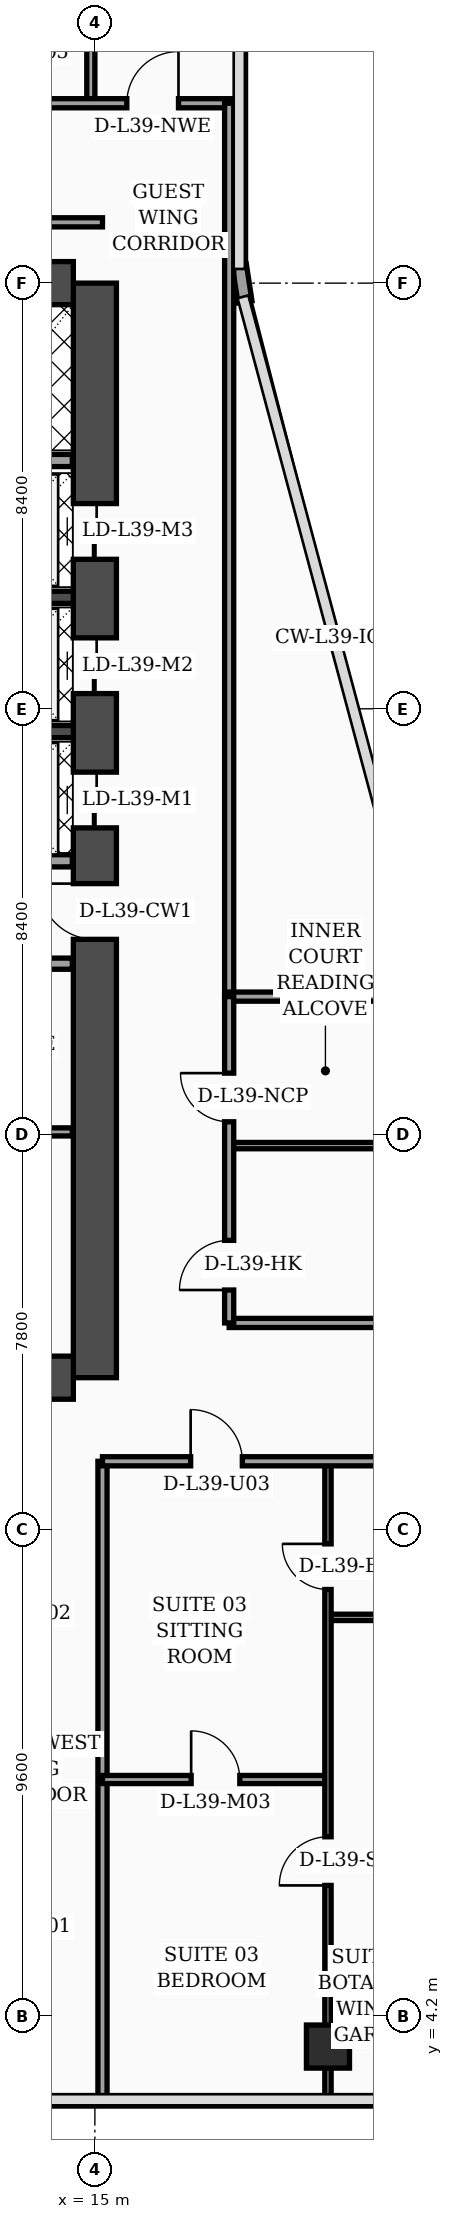
"""IFC4 building model, lengths in metres.
Left out: names, types, materials, properties, quantities, classifications, styles, units other than length and angle.
Written with IfcOpenShell. Run it as: python <this file> out.ifc"""

import sys

from ifc_helpers import new_model, si_unit, direction, frame, frame_2d, origin, origin_2d, place, context, subcontext, project, spatial, rectangle, hollow_rectangle, extrude, element, fill, save


model = new_model("IFC4")
c1 = context("Model", 3, precision=1e-05, world=origin(), true_north=direction((0.0, 1.0)))
c2 = subcontext(c1, "Body", "Model", "MODEL_VIEW")
j1 = project(units=[si_unit("LENGTHUNIT", "METRE"), si_unit("PLANEANGLEUNIT", "RADIAN")], contexts=[c1])
p1 = place(None, origin())
s1 = spatial("IfcSite", under=j1, at=p1, CompositionType="ELEMENT")
p2 = place(p1, origin())
s2 = spatial("IfcBuilding", under=s1, at=p2, CompositionType="ELEMENT")
p3 = place(p2, frame((0.0, 0.0, 159.9)))
s3 = spatial("IfcBuildingStorey", under=s2, at=p3, CompositionType="ELEMENT", Elevation=159.9)
p4 = place(p3, frame((15.0, 16.8, 0.0), z_axis=(0.0, 0.0, 1.0), x_axis=(0.0, 1.0, 0.0)))
e1 = element("IfcWall", 1, at=p4, inside=s3, PredefinedType="SHEAR", context=c2, shape_type="SweptSolid", body=[
    extrude(rectangle(XDim=21.6, YDim=0.85, at=frame_2d((10.8, 0.0))), origin(), (0.0, 0.0, 1.0), 3.56),
])
p5 = place(p4, frame((8.65, 0.0, 0.0)))
e2 = element("IfcOpeningElement", 2, at=p5, cuts=e1, PredefinedType="OPENING", context=c2, shape_type="SweptSolid", body=[
    extrude(rectangle(XDim=1.1, YDim=2.2, at=frame_2d((0.55, 1.1))), frame((0.0, 0.435, 0.0), z_axis=(0.0, -1.0, 0.0), x_axis=(1.0, 0.0, 0.0)), (0.0, 0.0, 1.0), 0.87),
])
p6 = place(p4, frame((10.85, 0.0, 0.0)))
e3 = element("IfcOpeningElement", 3, at=p6, cuts=e1, PredefinedType="OPENING", context=c2, shape_type="SweptSolid", body=[
    extrude(rectangle(XDim=1.1, YDim=2.2, at=frame_2d((0.55, 1.1))), frame((0.0, 0.435, 0.0), z_axis=(0.0, -1.0, 0.0), x_axis=(1.0, 0.0, 0.0)), (0.0, 0.0, 1.0), 0.87),
])
p7 = place(p4, frame((13.5, 0.0, 0.0)))
e4 = element("IfcOpeningElement", 4, at=p7, cuts=e1, PredefinedType="OPENING", context=c2, shape_type="SweptSolid", body=[
    extrude(rectangle(XDim=1.1, YDim=2.2, at=frame_2d((0.55, 1.1))), frame((0.0, 0.435, 0.0), z_axis=(0.0, -1.0, 0.0), x_axis=(1.0, 0.0, 0.0)), (0.0, 0.0, 1.0), 0.87),
])
p8 = place(p4, frame((16.15, 0.0, 0.0)))
e5 = element("IfcOpeningElement", 5, at=p8, cuts=e1, PredefinedType="OPENING", context=c2, shape_type="SweptSolid", body=[
    extrude(rectangle(XDim=1.1, YDim=2.2, at=frame_2d((0.55, 1.1))), frame((0.0, 0.435, 0.0), z_axis=(0.0, -1.0, 0.0), x_axis=(1.0, 0.0, 0.0)), (0.0, 0.0, 1.0), 0.87),
])
for number, where, z_axis, x_axis in (
    (6, (4.625, 38.4, 0.0), (0.0, 0.0, 1.0), (1.0, 0.0, 0.0)),
    (7, (4.625, 16.8, 0.0), (0.0, 0.0, 1.0), (1.0, 0.0, 0.0)),
):
    element("IfcWall", number, at=place(p3, frame(where, z_axis=z_axis, x_axis=x_axis)), inside=s3, PredefinedType="SHEAR", context=c2, shape_type="SweptSolid", body=[
        extrude(rectangle(XDim=9.95, YDim=0.85, at=frame_2d((4.975, 0.0))), origin(), (0.0, 0.0, 1.0), 3.56),
    ])
for number, where, z_axis, x_axis in (
    (8, (12.18, 29.55, 0.0), (0.0, 0.0, 1.0), (1.0, 0.0, 0.0)),
    (9, (12.18, 32.2, 0.0), (0.0, 0.0, 1.0), (1.0, 0.0, 0.0)),
):
    element("IfcWall", number, at=place(p3, frame(where, z_axis=z_axis, x_axis=x_axis)), inside=s3, PredefinedType="SOLIDWALL", context=c2, shape_type="SweptSolid", body=[
        extrude(rectangle(XDim=2.395, YDim=0.24, at=frame_2d((1.198, 0.0))), origin(), (0.0, 0.0, 1.0), 3.56),
    ])
p9 = place(p3, frame((19.6, 3.6, 0.0), z_axis=(0.0, 0.0, 1.0), x_axis=(1.0, 0.0, 0.0)))
e10 = element("IfcColumn", 10, at=p9, inside=s3, PredefinedType="COLUMN", context=c2, shape_type="SweptSolid", body=[
    extrude(hollow_rectangle(XDim=0.85, YDim=0.85, WallThickness=0.036, at=origin_2d()), origin(), (0.0, 0.0, 1.0), 3.56),
])
p10 = place(p3, frame((17.962, 38.03, 0.0), z_axis=(0.0, 0.0, 1.0), x_axis=(-0.15141125477, 0.988470855377, 0.0)))
e11 = element("IfcWall", 11, at=p10, inside=s3, PredefinedType="SOLIDWALL", context=c2, shape_type="SweptSolid", body=[
    extrude(rectangle(XDim=0.739, YDim=0.28, at=frame_2d((0.369, 0.0))), origin(), (0.0, 0.0, 1.0), 3.56),
])
p11 = place(p3, frame((9.68, 21.65, 0.0), z_axis=(0.0, 0.0, 1.0), x_axis=(1.0, 0.0, 0.0)))
e12 = element("IfcWall", 12, at=p11, inside=s3, PredefinedType="PARTITIONING", context=c2, shape_type="SweptSolid", body=[
    extrude(rectangle(XDim=4.875, YDim=0.16, at=frame_2d((2.438, 0.0))), origin(), (0.0, 0.0, 1.0), 3.09),
])
p12 = place(p11, frame((1.1, 0.0, 0.0)))
e13 = element("IfcOpeningElement", 13, at=p12, cuts=e12, PredefinedType="OPENING", context=c2, shape_type="SweptSolid", body=[
    extrude(rectangle(XDim=0.98, YDim=2.15, at=frame_2d((0.49, 1.075))), frame((0.0, 0.09, 0.0), z_axis=(0.0, -1.0, 0.0), x_axis=(1.0, 0.0, 0.0)), (0.0, 0.0, 1.0), 0.18),
])
p13 = place(p3, frame((9.68, 24.97, 0.0), z_axis=(0.0, 0.0, 1.0), x_axis=(1.0, 0.0, 0.0)))
e14 = element("IfcWall", 14, at=p13, inside=s3, PredefinedType="SOLIDWALL", context=c2, shape_type="SweptSolid", body=[
    extrude(rectangle(XDim=4.875, YDim=0.22, at=frame_2d((2.438, 0.0))), origin(), (0.0, 0.0, 1.0), 2.94),
])
p14 = place(p13, frame((0.9, 0.0, 0.0)))
e15 = element("IfcOpeningElement", 15, at=p14, cuts=e14, PredefinedType="OPENING", context=c2, shape_type="SweptSolid", body=[
    extrude(rectangle(XDim=0.98, YDim=2.15, at=frame_2d((0.49, 1.075))), frame((0.0, 0.12, 0.0), z_axis=(0.0, -1.0, 0.0), x_axis=(1.0, 0.0, 0.0)), (0.0, 0.0, 1.0), 0.24),
])
p15 = place(p3, frame((12.25, 27.0, 0.0), z_axis=(0.0, 0.0, 1.0), x_axis=(1.0, 0.0, 0.0)))
e16 = element("IfcWall", 16, at=p15, inside=s3, PredefinedType="SOLIDWALL", context=c2, shape_type="SweptSolid", body=[
    extrude(rectangle(XDim=2.305, YDim=0.24, at=frame_2d((1.152, 0.0))), origin(), (0.0, 0.0, 1.0), 3.56),
])
p16 = place(p3, frame((9.66, 34.9, 0.0), z_axis=(0.0, 0.0, 1.0), x_axis=(1.0, 0.0, 0.0)))
e17 = element("IfcWall", 17, at=p16, inside=s3, PredefinedType="SOLIDWALL", context=c2, shape_type="SweptSolid", body=[
    extrude(rectangle(XDim=4.895, YDim=0.24, at=frame_2d((2.448, 0.0))), origin(), (0.0, 0.0, 1.0), 3.56),
])
p17 = place(p3, frame((15.15, 2.44, 0.0), z_axis=(0.0, 0.0, 1.0), x_axis=(0.0, 1.0, 0.0)))
e18 = element("IfcWall", 18, at=p17, inside=s3, PredefinedType="PARTITIONING", context=c2, shape_type="SweptSolid", body=[
    extrude(rectangle(XDim=12.71, YDim=0.18, at=frame_2d((6.355, 0.0))), origin(), (0.0, 0.0, 1.0), 3.04),
])
p18 = place(p3, frame((19.6, 12.07, 0.0), z_axis=(0.0, 0.0, 1.0), x_axis=(1.0, 0.0, 0.0)))
e19 = element("IfcWall", 19, at=p18, inside=s3, PredefinedType="PARTITIONING", context=c2, shape_type="SweptSolid", body=[
    extrude(rectangle(XDim=2.0, YDim=0.125, at=frame_2d((1.0, 0.0))), origin(), (0.0, 0.0, 1.0), 3.56),
])
p19 = place(p3, frame((15.15, 8.87, 0.0), z_axis=(0.0, 0.0, 1.0), x_axis=(1.0, 0.0, 0.0)))
e20 = element("IfcWall", 20, at=p19, inside=s3, PredefinedType="PARTITIONING", context=c2, shape_type="SweptSolid", body=[
    extrude(rectangle(XDim=4.45, YDim=0.16, at=frame_2d((2.225, 0.0))), origin(), (0.0, 0.0, 1.0), 3.56),
])
p20 = place(p19, frame((1.75, 0.0, 0.0)))
e21 = element("IfcOpeningElement", 21, at=p20, cuts=e20, PredefinedType="OPENING", context=c2, shape_type="SweptSolid", body=[
    extrude(rectangle(XDim=0.96, YDim=2.2, at=frame_2d((0.48, 1.1))), frame((0.0, 0.09, 0.0), z_axis=(0.0, -1.0, 0.0), x_axis=(1.0, 0.0, 0.0)), (0.0, 0.0, 1.0), 0.18),
])
p21 = place(p3, frame((19.6, 2.44, 0.0), z_axis=(0.0, 0.0, 1.0), x_axis=(0.0, 1.0, 0.0)))
e22 = element("IfcWall", 22, at=p21, inside=s3, PredefinedType="PARTITIONING", context=c2, shape_type="SweptSolid", body=[
    extrude(rectangle(XDim=12.71, YDim=0.125, at=frame_2d((6.355, 0.0))), origin(), (0.0, 0.0, 1.0), 2.49),
])
p22 = place(p21, frame((4.34, 0.0, 0.0)))
e23 = element("IfcOpeningElement", 23, at=p22, cuts=e22, PredefinedType="OPENING", context=c2, shape_type="SweptSolid", body=[
    extrude(rectangle(XDim=0.96, YDim=2.2, at=frame_2d((0.48, 1.1))), frame((0.0, 0.073, 0.0), z_axis=(0.0, -1.0, 0.0), x_axis=(1.0, 0.0, 0.0)), (0.0, 0.0, 1.0), 0.145),
])
p23 = place(p21, frame((10.18, 0.0, 0.0)))
e24 = element("IfcOpeningElement", 24, at=p23, cuts=e22, PredefinedType="OPENING", context=c2, shape_type="SweptSolid", body=[
    extrude(rectangle(XDim=0.9, YDim=2.15, at=frame_2d((0.45, 1.075))), frame((0.0, 0.073, 0.0), z_axis=(0.0, -1.0, 0.0), x_axis=(1.0, 0.0, 0.0)), (0.0, 0.0, 1.0), 0.145),
])
p24 = place(p3, frame((15.15, 15.15, 0.0), z_axis=(0.0, 0.0, 1.0), x_axis=(1.0, 0.0, 0.0)))
e25 = element("IfcWall", 25, at=p24, inside=s3, PredefinedType="PARTITIONING", context=c2, shape_type="SweptSolid", body=[
    extrude(rectangle(XDim=6.45, YDim=0.18, at=frame_2d((3.225, 0.0))), origin(), (0.0, 0.0, 1.0), 2.49),
])
p25 = place(p24, frame((1.74, 0.0, 0.0)))
e26 = element("IfcOpeningElement", 26, at=p25, cuts=e25, PredefinedType="OPENING", context=c2, shape_type="SweptSolid", body=[
    extrude(rectangle(XDim=1.02, YDim=2.2, at=frame_2d((0.51, 1.1))), frame((0.0, 0.1, 0.0), z_axis=(0.0, -1.0, 0.0), x_axis=(1.0, 0.0, 0.0)), (0.0, 0.0, 1.0), 0.2),
])
p26 = place(p3, frame((14.92, 41.95, 0.0), z_axis=(0.0, 0.0, 1.0), x_axis=(0.0, 1.0, 0.0)))
e27 = element("IfcWall", 27, at=p26, inside=s3, PredefinedType="PARTITIONING", context=c2, shape_type="SweptSolid", body=[
    extrude(rectangle(XDim=5.85, YDim=0.16, at=frame_2d((2.925, 0.0))), origin(), (0.0, 0.0, 1.0), 3.04),
])
p27 = place(p3, frame((0.08, 41.95, 0.0), z_axis=(0.0, 0.0, 1.0), x_axis=(1.0, 0.0, 0.0)))
e28 = element("IfcWall", 28, at=p27, inside=s3, PredefinedType="PARTITIONING", context=c2, shape_type="SweptSolid", body=[
    extrude(rectangle(XDim=17.77, YDim=0.18, at=frame_2d((8.885, 0.0))), origin(), (0.0, 0.0, 1.0), 2.94),
])
p28 = place(p27, frame((0.9, 0.0, 0.0)))
e29 = element("IfcOpeningElement", 29, at=p28, cuts=e28, PredefinedType="OPENING", context=c2, shape_type="SweptSolid", body=[
    extrude(rectangle(XDim=1.02, YDim=2.2, at=frame_2d((0.51, 1.1))), frame((0.0, 0.1, 0.0), z_axis=(0.0, -1.0, 0.0), x_axis=(1.0, 0.0, 0.0)), (0.0, 0.0, 1.0), 0.2),
])
p29 = place(p27, frame((4.9, 0.0, 0.0)))
e30 = element("IfcOpeningElement", 30, at=p29, cuts=e28, PredefinedType="OPENING", context=c2, shape_type="SweptSolid", body=[
    extrude(rectangle(XDim=1.02, YDim=2.2, at=frame_2d((0.51, 1.1))), frame((0.0, 0.1, 0.0), z_axis=(0.0, -1.0, 0.0), x_axis=(1.0, 0.0, 0.0)), (0.0, 0.0, 1.0), 0.2),
])
p30 = place(p27, frame((10.78, 0.0, 0.0)))
e31 = element("IfcOpeningElement", 31, at=p30, cuts=e28, PredefinedType="OPENING", context=c2, shape_type="SweptSolid", body=[
    extrude(rectangle(XDim=1.02, YDim=2.2, at=frame_2d((0.51, 1.1))), frame((0.0, 0.1, 0.0), z_axis=(0.0, -1.0, 0.0), x_axis=(1.0, 0.0, 0.0)), (0.0, 0.0, 1.0), 0.2),
])
p31 = place(p27, frame((15.55, 0.0, 0.0)))
e32 = element("IfcOpeningElement", 32, at=p31, cuts=e28, PredefinedType="OPENING", context=c2, shape_type="SweptSolid", body=[
    extrude(rectangle(XDim=1.02, YDim=2.2, at=frame_2d((0.51, 1.1))), frame((0.0, 0.1, 0.0), z_axis=(0.0, -1.0, 0.0), x_axis=(1.0, 0.0, 0.0)), (0.0, 0.0, 1.0), 0.2),
])
p32 = place(p3, frame((17.65, 24.3, 0.0), z_axis=(0.0, 0.0, 1.0), x_axis=(0.0, 1.0, 0.0)))
e33 = element("IfcWall", 33, at=p32, inside=s3, PredefinedType="PARTITIONING", context=c2, shape_type="SweptSolid", body=[
    extrude(rectangle(XDim=17.65, YDim=0.18, at=frame_2d((8.825, 0.0))), origin(), (0.0, 0.0, 1.0), 2.94),
])
p33 = place(p3, frame((3.755, 39.6, 0.0), z_axis=(0.0, 0.0, 1.0), x_axis=(1.0, 0.0, 0.0)))
e34 = element("IfcWall", 34, at=p33, inside=s3, PredefinedType="PARTITIONING", context=c2, shape_type="SweptSolid", body=[
    extrude(rectangle(XDim=11.395, YDim=0.18, at=frame_2d((5.698, 0.0))), origin(), (0.0, 0.0, 1.0), 2.94),
])
p34 = place(p3, frame((17.65, 17.88, 0.0), z_axis=(0.0, 0.0, 1.0), x_axis=(1.0, 0.0, 0.0)))
e35 = element("IfcWall", 35, at=p34, inside=s3, PredefinedType="PARTITIONING", context=c2, shape_type="SweptSolid", body=[
    extrude(rectangle(XDim=3.9, YDim=0.18, at=frame_2d((1.95, 0.0))), origin(), (0.0, 0.0, 1.0), 3.56),
])
p35 = place(p3, frame((17.65, 21.38, 0.0), z_axis=(0.0, 0.0, 1.0), x_axis=(1.0, 0.0, 0.0)))
e36 = element("IfcWall", 36, at=p35, inside=s3, PredefinedType="PARTITIONING", context=c2, shape_type="SweptSolid", body=[
    extrude(rectangle(XDim=3.9, YDim=0.125, at=frame_2d((1.95, 0.0))), origin(), (0.0, 0.0, 1.0), 3.09),
])
p36 = place(p3, frame((17.65, 24.32, 0.0), z_axis=(0.0, 0.0, 1.0), x_axis=(1.0, 0.0, 0.0)))
e37 = element("IfcWall", 37, at=p36, inside=s3, PredefinedType="PARTITIONING", context=c2, shape_type="SweptSolid", body=[
    extrude(rectangle(XDim=3.95, YDim=0.18, at=frame_2d((1.975, 0.0))), origin(), (0.0, 0.0, 1.0), 3.56),
])
p37 = place(p3, frame((17.65, 17.88, 0.0), z_axis=(0.0, 0.0, 1.0), x_axis=(0.0, 1.0, 0.0)))
e38 = element("IfcWall", 38, at=p37, inside=s3, PredefinedType="PARTITIONING", context=c2, shape_type="SweptSolid", body=[
    extrude(rectangle(XDim=6.44, YDim=0.18, at=frame_2d((3.22, 0.0))), origin(), (0.0, 0.0, 1.0), 3.09),
])
p38 = place(p37, frame((0.65, 0.0, 0.0)))
e39 = element("IfcOpeningElement", 39, at=p38, cuts=e38, PredefinedType="OPENING", context=c2, shape_type="SweptSolid", body=[
    extrude(rectangle(XDim=0.98, YDim=2.15, at=frame_2d((0.49, 1.075))), frame((0.0, 0.1, 0.0), z_axis=(0.0, -1.0, 0.0), x_axis=(1.0, 0.0, 0.0)), (0.0, 0.0, 1.0), 0.2),
])
p39 = place(p37, frame((3.97, 0.0, 0.0)))
e40 = element("IfcOpeningElement", 40, at=p39, cuts=e38, PredefinedType="OPENING", context=c2, shape_type="SweptSolid", body=[
    extrude(rectangle(XDim=0.96, YDim=2.2, at=frame_2d((0.48, 1.1))), frame((0.0, 0.1, 0.0), z_axis=(0.0, -1.0, 0.0), x_axis=(1.0, 0.0, 0.0)), (0.0, 0.0, 1.0), 0.2),
])
p40 = place(p20, origin())
e41 = element("IfcDoor", 41, at=p40, inside=s3, OperationType="SINGLE_SWING_LEFT", PredefinedType="DOOR", context=c2, shape_type="SweptSolid", body=[
    extrude(rectangle(XDim=0.96, YDim=2.2, at=frame_2d((0.48, 1.1))), frame((0.0, 0.025, 0.0), z_axis=(0.0, -1.0, 0.0), x_axis=(1.0, 0.0, 0.0)), (0.0, 0.0, 1.0), 0.05),
])
fill(e21, e41)
p41 = place(p22, origin())
e42 = element("IfcDoor", 42, at=p41, inside=s3, OperationType="SINGLE_SWING_LEFT", PredefinedType="DOOR", context=c2, shape_type="SweptSolid", body=[
    extrude(rectangle(XDim=0.96, YDim=2.2, at=frame_2d((0.48, 1.1))), frame((0.0, 0.025, 0.0), z_axis=(0.0, -1.0, 0.0), x_axis=(1.0, 0.0, 0.0)), (0.0, 0.0, 1.0), 0.05),
])
fill(e23, e42)
p42 = place(p23, origin())
e43 = element("IfcDoor", 43, at=p42, inside=s3, OperationType="SINGLE_SWING_RIGHT", PredefinedType="DOOR", context=c2, shape_type="SweptSolid", body=[
    extrude(rectangle(XDim=0.9, YDim=2.15, at=frame_2d((0.45, 1.075))), frame((0.0, 0.025, 0.0), z_axis=(0.0, -1.0, 0.0), x_axis=(1.0, 0.0, 0.0)), (0.0, 0.0, 1.0), 0.05),
])
fill(e24, e43)
p43 = place(p25, origin())
e44 = element("IfcDoor", 44, at=p43, inside=s3, OperationType="SINGLE_SWING_LEFT", PredefinedType="DOOR", context=c2, shape_type="SweptSolid", body=[
    extrude(rectangle(XDim=1.02, YDim=2.2, at=frame_2d((0.51, 1.1))), frame((0.0, 0.025, 0.0), z_axis=(0.0, -1.0, 0.0), x_axis=(1.0, 0.0, 0.0)), (0.0, 0.0, 1.0), 0.05),
])
fill(e26, e44)
p44 = place(p31, origin())
e45 = element("IfcDoor", 45, at=p44, inside=s3, OperationType="SINGLE_SWING_RIGHT", PredefinedType="DOOR", context=c2, shape_type="SweptSolid", body=[
    extrude(rectangle(XDim=1.02, YDim=2.2, at=frame_2d((0.51, 1.1))), frame((0.0, 0.025, 0.0), z_axis=(0.0, -1.0, 0.0), x_axis=(1.0, 0.0, 0.0)), (0.0, 0.0, 1.0), 0.05),
])
fill(e32, e45)
p45 = place(p38, origin())
e46 = element("IfcDoor", 46, at=p45, inside=s3, OperationType="SINGLE_SWING_LEFT", PredefinedType="DOOR", context=c2, shape_type="SweptSolid", body=[
    extrude(rectangle(XDim=0.98, YDim=2.15, at=frame_2d((0.49, 1.075))), frame((0.0, 0.025, 0.0), z_axis=(0.0, -1.0, 0.0), x_axis=(1.0, 0.0, 0.0)), (0.0, 0.0, 1.0), 0.05),
])
fill(e39, e46)
p46 = place(p39, origin())
e47 = element("IfcDoor", 47, at=p46, inside=s3, OperationType="SINGLE_SWING_RIGHT", PredefinedType="DOOR", context=c2, shape_type="SweptSolid", body=[
    extrude(rectangle(XDim=0.96, YDim=2.2, at=frame_2d((0.48, 1.1))), frame((0.0, 0.025, 0.0), z_axis=(0.0, -1.0, 0.0), x_axis=(1.0, 0.0, 0.0)), (0.0, 0.0, 1.0), 0.05),
])
fill(e40, e47)
p47 = place(p5, origin())
e48 = element("IfcDoor", 48, at=p47, inside=s3, OperationType="SINGLE_SWING_RIGHT", PredefinedType="DOOR", context=c2, shape_type="SweptSolid", body=[
    extrude(rectangle(XDim=1.1, YDim=2.2, at=frame_2d((0.55, 1.1))), frame((0.0, 0.025, 0.0), z_axis=(0.0, -1.0, 0.0), x_axis=(1.0, 0.0, 0.0)), (0.0, 0.0, 1.0), 0.05),
])
fill(e2, e48)
p48 = place(p6, origin())
e49 = element("IfcDoor", 49, at=p48, inside=s3, OperationType="DOUBLE_DOOR_SLIDING", PredefinedType="DOOR", context=c2, shape_type="SweptSolid", body=[
    extrude(rectangle(XDim=1.1, YDim=2.2, at=frame_2d((0.55, 1.1))), frame((0.0, 0.025, 0.0), z_axis=(0.0, -1.0, 0.0), x_axis=(1.0, 0.0, 0.0)), (0.0, 0.0, 1.0), 0.05),
])
fill(e3, e49)
p49 = place(p7, origin())
e50 = element("IfcDoor", 50, at=p49, inside=s3, OperationType="DOUBLE_DOOR_SLIDING", PredefinedType="DOOR", context=c2, shape_type="SweptSolid", body=[
    extrude(rectangle(XDim=1.1, YDim=2.2, at=frame_2d((0.55, 1.1))), frame((0.0, 0.025, 0.0), z_axis=(0.0, -1.0, 0.0), x_axis=(1.0, 0.0, 0.0)), (0.0, 0.0, 1.0), 0.05),
])
fill(e4, e50)
p50 = place(p8, origin())
e51 = element("IfcDoor", 51, at=p50, inside=s3, OperationType="DOUBLE_DOOR_SLIDING", PredefinedType="DOOR", context=c2, shape_type="SweptSolid", body=[
    extrude(rectangle(XDim=1.1, YDim=2.2, at=frame_2d((0.55, 1.1))), frame((0.0, 0.025, 0.0), z_axis=(0.0, -1.0, 0.0), x_axis=(1.0, 0.0, 0.0)), (0.0, 0.0, 1.0), 0.05),
])
fill(e5, e51)
save(model, sys.argv[1])
